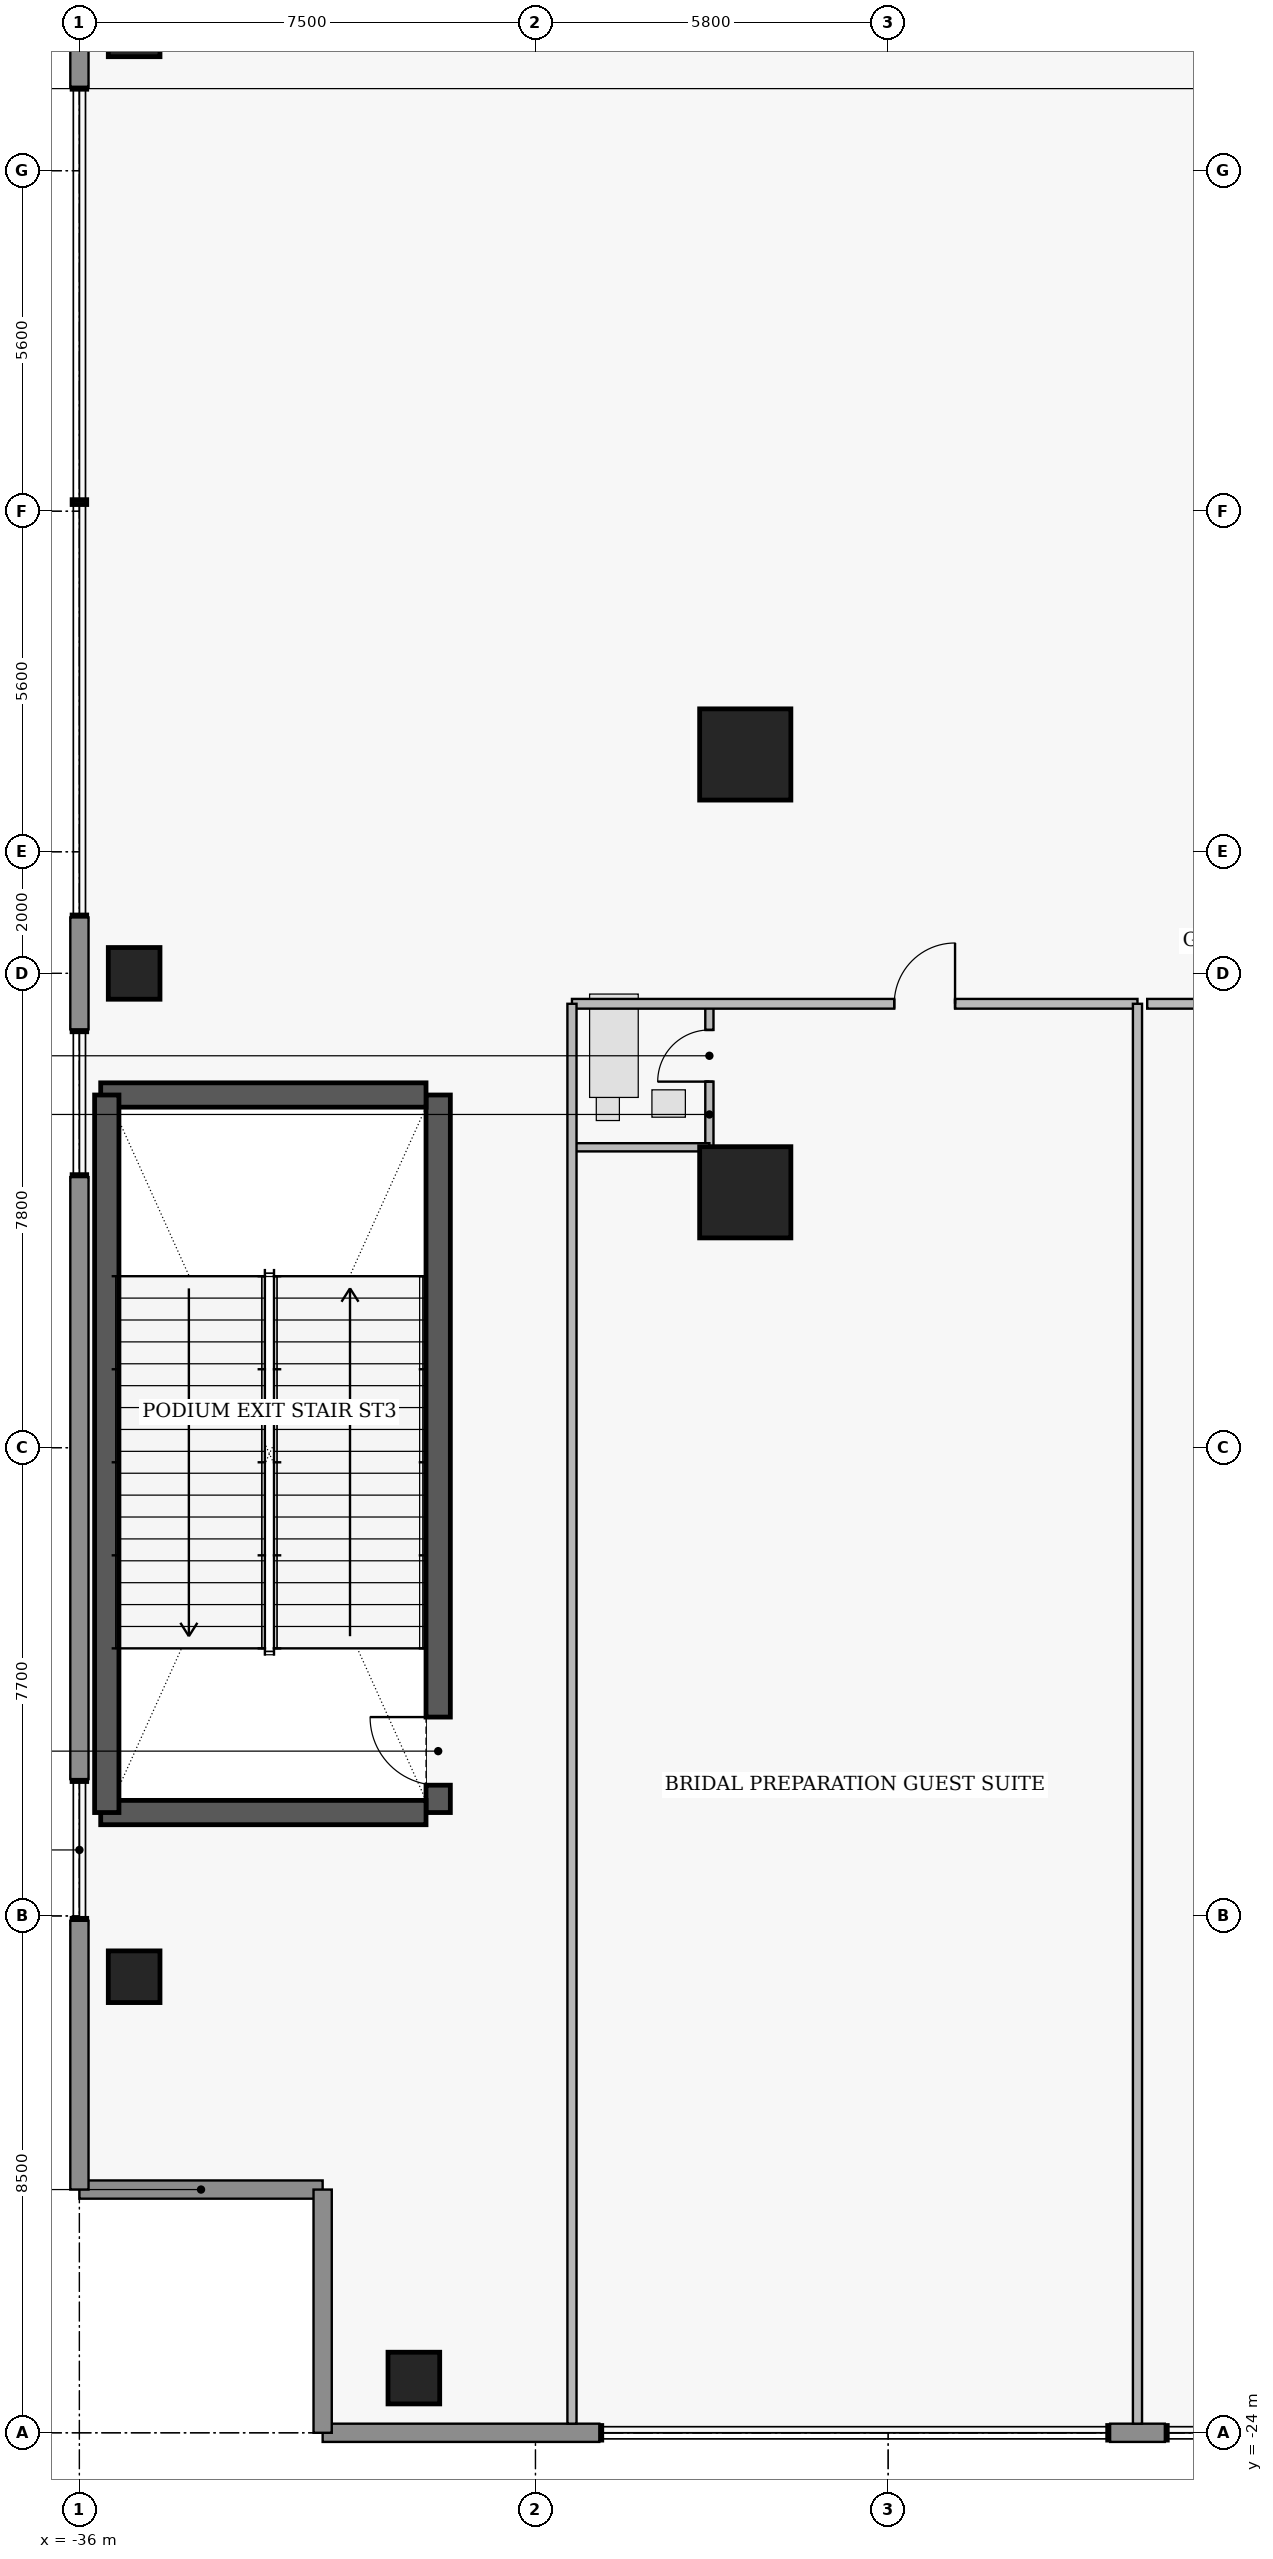
"""IFC4 building model, lengths in metres.
Left out: names, types, materials, properties, quantities, classifications, styles, units other than length and angle.
Written with IfcOpenShell. Run it as: python <this file> out.ifc"""

import sys

from ifc_helpers import new_model, si_unit, direction, frame, frame_2d, origin, origin_2d, place, context, subcontext, project, spatial, rectangle, extrude, element, fill, save


model = new_model("IFC4")
c1 = context("Model", 3, precision=1e-05, world=origin(), true_north=direction((0.0, 1.0)))
c2 = subcontext(c1, "Body", "Model", "MODEL_VIEW")
j1 = project(units=[si_unit("LENGTHUNIT", "METRE"), si_unit("PLANEANGLEUNIT", "RADIAN")], contexts=[c1])
p1 = place(None, origin())
s1 = spatial("IfcSite", under=j1, at=p1, CompositionType="ELEMENT")
p2 = place(p1, origin())
s2 = spatial("IfcBuilding", under=s1, at=p2, CompositionType="ELEMENT")
p3 = place(p2, frame((0.0, 0.0, 11.4)))
s3 = spatial("IfcBuildingStorey", under=s2, at=p3, CompositionType="ELEMENT", Elevation=11.4)
p4 = place(p3, frame((-30.1, -13.8, 0.0), z_axis=(0.0, 0.0, 1.0), x_axis=(0.0, 1.0, 0.0)))
e1 = element("IfcWall", 1, at=p4, inside=s3, PredefinedType="SHEAR", context=c2, shape_type="SweptSolid", body=[
    extrude(rectangle(XDim=11.8, YDim=0.4, at=frame_2d((5.9, 0.0))), origin(), (0.0, 0.0, 1.0), 6.41),
])
p5 = place(p4, frame((0.45, 0.0, 0.0)))
e2 = element("IfcOpeningElement", 2, at=p5, cuts=e1, PredefinedType="OPENING", context=c2, shape_type="SweptSolid", body=[
    extrude(rectangle(XDim=1.12, YDim=2.22, at=frame_2d((0.56, 1.11))), frame((0.0, 0.21, 0.0), z_axis=(0.0, -1.0, 0.0), x_axis=(1.0, 0.0, 0.0)), (0.0, 0.0, 1.0), 0.42),
])
for number, where, z_axis, x_axis in (
    (3, (-35.65, -13.8, 0.0), (0.0, 0.0, 1.0), (1.0, 0.0, 0.0)),
    (4, (-35.65, -2.0, 0.0), (0.0, 0.0, 1.0), (1.0, 0.0, 0.0)),
):
    element("IfcWall", number, at=place(p3, frame(where, z_axis=z_axis, x_axis=x_axis)), inside=s3, PredefinedType="SHEAR", context=c2, shape_type="SweptSolid", body=[
        extrude(rectangle(XDim=5.35, YDim=0.4, at=frame_2d((2.675, 0.0))), origin(), (0.0, 0.0, 1.0), 6.41),
    ])
p6 = place(p3, frame((-35.55, -13.8, 0.0), z_axis=(0.0, 0.0, 1.0), x_axis=(0.0, 1.0, 0.0)))
e5 = element("IfcWall", 5, at=p6, inside=s3, PredefinedType="SHEAR", context=c2, shape_type="SweptSolid", body=[
    extrude(rectangle(XDim=11.8, YDim=0.4, at=frame_2d((5.9, 0.0))), origin(), (0.0, 0.0, 1.0), 6.41),
])
for number, where, z_axis, x_axis in (
    (6, (-25.05, -3.6, 0.0), (0.0, 0.0, 1.0), (1.0, 0.0, 0.0)),
    (7, (-25.05, 3.6, 0.0), (0.0, 0.0, 1.0), (1.0, 0.0, 0.0)),
):
    element("IfcColumn", number, at=place(p3, frame(where, z_axis=z_axis, x_axis=x_axis)), inside=s3, PredefinedType="COLUMN", context=c2, shape_type="SweptSolid", body=[
        extrude(rectangle(XDim=1.5, YDim=1.5, at=origin_2d()), origin(), (0.0, 0.0, 1.0), 6.6),
    ])
for number, where, z_axis, x_axis in (
    (8, (-30.5, -23.1, 0.0), (0.0, 0.0, 1.0), (1.0, 0.0, 0.0)),
    (9, (-35.1, -16.5, 0.0), (0.0, 0.0, 1.0), (1.0, 0.0, 0.0)),
    (10, (-35.1, 0.0, 0.0), (0.0, 0.0, 1.0), (1.0, 0.0, 0.0)),
    (11, (-35.1, 15.5, 0.0), (0.0, 0.0, 1.0), (1.0, 0.0, 0.0)),
):
    element("IfcColumn", number, at=place(p3, frame(where, z_axis=z_axis, x_axis=x_axis)), inside=s3, PredefinedType="COLUMN", context=c2, shape_type="SweptSolid", body=[
        extrude(rectangle(XDim=0.85, YDim=0.85, at=origin_2d()), origin(), (0.0, 0.0, 1.0), 6.6),
    ])
p7 = place(p3, frame((-32.0, -20.0, 0.0), z_axis=(0.0, 0.0, 1.0), x_axis=(-1.0, 0.0, 0.0)))
e12 = element("IfcWall", 12, at=p7, inside=s3, PredefinedType="STANDARD", context=c2, shape_type="SweptSolid", body=[
    extrude(rectangle(XDim=4.0, YDim=0.3, at=frame_2d((2.0, 0.0))), origin(), (0.0, 0.0, 1.0), 6.34),
])
p8 = place(p3, frame((-36.0, -20.0, 0.0), z_axis=(0.0, 0.0, 1.0), x_axis=(0.0, 1.0, 0.0)))
e13 = element("IfcWall", 13, at=p8, inside=s3, PredefinedType="STANDARD", context=c2, shape_type="SweptSolid", body=[
    extrude(rectangle(XDim=4.42, YDim=0.3, at=frame_2d((2.21, 0.0))), origin(), (0.0, 0.0, 1.0), 6.34),
])
p9 = place(p3, frame((-36.0, -13.25, 0.0), z_axis=(0.0, 0.0, 1.0), x_axis=(0.0, 1.0, 0.0)))
e14 = element("IfcWall", 14, at=p9, inside=s3, PredefinedType="STANDARD", context=c2, shape_type="SweptSolid", body=[
    extrude(rectangle(XDim=9.9, YDim=0.3, at=frame_2d((4.95, 0.0))), origin(), (0.0, 0.0, 1.0), 6.34),
])
for number, where, z_axis, x_axis in (
    (15, (-36.0, -0.92, 0.0), (0.0, 0.0, 1.0), (0.0, 1.0, 0.0)),
    (16, (-36.0, 14.58, 0.0), (0.0, 0.0, 1.0), (0.0, 1.0, 0.0)),
):
    element("IfcWall", number, at=place(p3, frame(where, z_axis=z_axis, x_axis=x_axis)), inside=s3, PredefinedType="STANDARD", context=c2, shape_type="SweptSolid", body=[
        extrude(rectangle(XDim=1.84, YDim=0.3, at=frame_2d((0.92, 0.0))), origin(), (0.0, 0.0, 1.0), 6.34),
    ])
p10 = place(p3, frame((-18.15, -24.0, 0.0), z_axis=(0.0, 0.0, 1.0), x_axis=(-1.0, 0.0, 0.0)))
e17 = element("IfcWall", 17, at=p10, inside=s3, PredefinedType="STANDARD", context=c2, shape_type="SweptSolid", body=[
    extrude(rectangle(XDim=0.9, YDim=0.3, at=frame_2d((0.45, 0.0))), origin(), (0.0, 0.0, 1.0), 6.34),
])
p11 = place(p3, frame((-27.45, -24.0, 0.0), z_axis=(0.0, 0.0, 1.0), x_axis=(-1.0, 0.0, 0.0)))
e18 = element("IfcWall", 18, at=p11, inside=s3, PredefinedType="STANDARD", context=c2, shape_type="SweptSolid", body=[
    extrude(rectangle(XDim=4.55, YDim=0.3, at=frame_2d((2.275, 0.0))), origin(), (0.0, 0.0, 1.0), 6.34),
])
p12 = place(p3, frame((-32.0, -24.0, 0.0), z_axis=(0.0, 0.0, 1.0), x_axis=(0.0, 1.0, 0.0)))
e19 = element("IfcWall", 19, at=p12, inside=s3, PredefinedType="STANDARD", context=c2, shape_type="SweptSolid", body=[
    extrude(rectangle(XDim=4.0, YDim=0.3, at=frame_2d((2.0, 0.0))), origin(), (0.0, 0.0, 1.0), 6.34),
])
p13 = place(p3, frame((-25.64, -2.86, 0.0), z_axis=(0.0, 0.0, 1.0), x_axis=(0.0, 1.0, 0.0)))
e20 = element("IfcWall", 20, at=p13, inside=s3, PredefinedType="PLUMBINGWALL", context=c2, shape_type="SweptSolid", body=[
    extrude(rectangle(XDim=2.36, YDim=0.135, at=frame_2d((1.18, 0.0))), origin(), (0.0, 0.0, 1.0), 6.34),
])
p14 = place(p13, frame((1.08, 0.0, 0.0)))
e21 = element("IfcOpeningElement", 21, at=p14, cuts=e20, PredefinedType="OPENING", context=c2, shape_type="SweptSolid", body=[
    extrude(rectangle(XDim=0.85, YDim=2.1, at=frame_2d((0.425, 1.05))), frame((0.0, 0.077, 0.0), z_axis=(0.0, -1.0, 0.0), x_axis=(1.0, 0.0, 0.0)), (0.0, 0.0, 1.0), 0.155),
])
p15 = place(p3, frame((-27.9, -0.5, 0.0), z_axis=(0.0, 0.0, 1.0), x_axis=(1.0, 0.0, 0.0)))
e22 = element("IfcWall", 22, at=p15, inside=s3, PredefinedType="PARTITIONING", context=c2, shape_type="SweptSolid", body=[
    extrude(rectangle(XDim=9.3, YDim=0.16, at=frame_2d((4.65, 0.0))), origin(), (0.0, 0.0, 1.0), 6.34),
])
p16 = place(p15, frame((5.3, 0.0, 0.0)))
e23 = element("IfcOpeningElement", 23, at=p16, cuts=e22, PredefinedType="OPENING", context=c2, shape_type="SweptSolid", body=[
    extrude(rectangle(XDim=1.0, YDim=2.15, at=frame_2d((0.5, 1.075))), frame((0.0, 0.09, 0.0), z_axis=(0.0, -1.0, 0.0), x_axis=(1.0, 0.0, 0.0)), (0.0, 0.0, 1.0), 0.18),
])
p17 = place(p3, frame((-18.44, -0.5, 0.0), z_axis=(0.0, 0.0, 1.0), x_axis=(1.0, 0.0, 0.0)))
e24 = element("IfcWall", 24, at=p17, inside=s3, PredefinedType="PARTITIONING", context=c2, shape_type="SweptSolid", body=[
    extrude(rectangle(XDim=36.88, YDim=0.16, at=frame_2d((18.44, 0.0))), origin(), (0.0, 0.0, 1.0), 6.34),
])
p18 = place(p17, frame((17.9, 0.0, 0.0)))
e25 = element("IfcOpeningElement", 25, at=p18, cuts=e24, PredefinedType="OPENING", context=c2, shape_type="SweptSolid", body=[
    extrude(rectangle(XDim=1.08, YDim=2.18, at=frame_2d((0.54, 1.09))), frame((0.0, 0.09, 0.0), z_axis=(0.0, -1.0, 0.0), x_axis=(1.0, 0.0, 0.0)), (0.0, 0.0, 1.0), 0.18),
])
p19 = place(p3, frame((-27.9, -2.86, 0.0), z_axis=(0.0, 0.0, 1.0), x_axis=(1.0, 0.0, 0.0)))
e26 = element("IfcWall", 26, at=p19, inside=s3, PredefinedType="PLUMBINGWALL", context=c2, shape_type="SweptSolid", body=[
    extrude(rectangle(XDim=2.26, YDim=0.135, at=frame_2d((1.13, 0.0))), origin(), (0.0, 0.0, 1.0), 6.34),
])
for number, where, z_axis, x_axis in (
    (27, (-27.9, -23.85, 0.0), (0.0, 0.0, 1.0), (0.0, 1.0, 0.0)),
    (28, (-18.6, -23.85, 0.0), (0.0, 0.0, 1.0), (0.0, 1.0, 0.0)),
):
    element("IfcWall", number, at=place(p3, frame(where, z_axis=z_axis, x_axis=x_axis)), inside=s3, PredefinedType="PARTITIONING", context=c2, shape_type="SweptSolid", body=[
        extrude(rectangle(XDim=23.35, YDim=0.15, at=frame_2d((11.675, 0.0))), origin(), (0.0, 0.0, 1.0), 6.34),
    ])
p20 = place(p5, origin())
e29 = element("IfcDoor", 29, at=p20, inside=s3, OperationType="SINGLE_SWING_RIGHT", PredefinedType="DOOR", context=c2, shape_type="SweptSolid", body=[
    extrude(rectangle(XDim=1.12, YDim=2.22, at=frame_2d((0.56, 1.11))), frame((0.0, 0.025, 0.0), z_axis=(0.0, -1.0, 0.0), x_axis=(1.0, 0.0, 0.0)), (0.0, 0.0, 1.0), 0.05),
])
fill(e2, e29)
p21 = place(p14, origin())
e30 = element("IfcDoor", 30, at=p21, inside=s3, OperationType="SINGLE_SWING_LEFT", PredefinedType="DOOR", context=c2, shape_type="SweptSolid", body=[
    extrude(rectangle(XDim=0.85, YDim=2.1, at=frame_2d((0.425, 1.05))), frame((0.0, 0.025, 0.0), z_axis=(0.0, -1.0, 0.0), x_axis=(1.0, 0.0, 0.0)), (0.0, 0.0, 1.0), 0.05),
])
fill(e21, e30)
p22 = place(p16, origin())
e31 = element("IfcDoor", 31, at=p22, inside=s3, OperationType="SINGLE_SWING_RIGHT", PredefinedType="DOOR", context=c2, shape_type="SweptSolid", body=[
    extrude(rectangle(XDim=1.0, YDim=2.15, at=frame_2d((0.5, 1.075))), frame((0.0, 0.025, 0.0), z_axis=(0.0, -1.0, 0.0), x_axis=(1.0, 0.0, 0.0)), (0.0, 0.0, 1.0), 0.05),
])
fill(e23, e31)
save(model, sys.argv[1])
